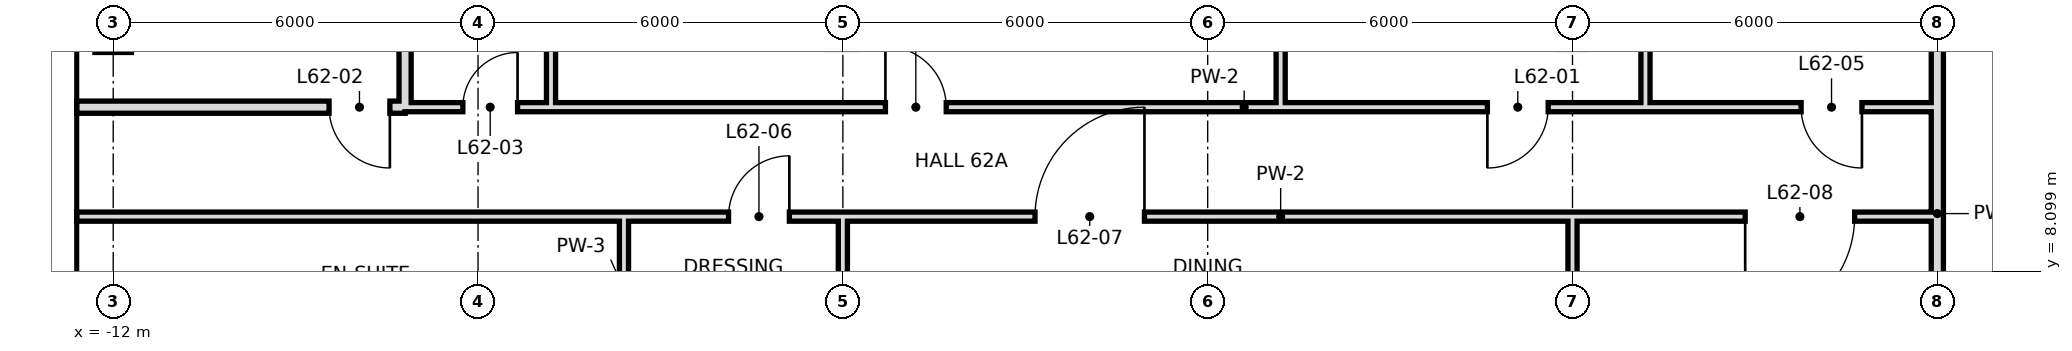
"""IFC4 building model, lengths in metres.
Left out: names, types, materials, properties, quantities, classifications, styles, units other than length and angle.
Written with IfcOpenShell. Run it as: python <this file> out.ifc"""

import sys

from ifc_helpers import new_model, si_unit, direction, frame, frame_2d, origin, place, context, subcontext, project, spatial, rectangle, extrude, element, fill, save


model = new_model("IFC4")
c1 = context("Model", 3, precision=1e-05, world=origin(), true_north=direction((0.0, 1.0)))
c2 = subcontext(c1, "Body", "Model", "MODEL_VIEW")
j1 = project(units=[si_unit("LENGTHUNIT", "METRE"), si_unit("PLANEANGLEUNIT", "RADIAN")], contexts=[c1])
p1 = place(None, origin())
s1 = spatial("IfcSite", under=j1, at=p1, CompositionType="ELEMENT")
p2 = place(p1, origin())
s2 = spatial("IfcBuilding", under=s1, at=p2, CompositionType="ELEMENT")
p3 = place(p2, frame((0.0, 0.0, 263.0)))
s3 = spatial("IfcBuildingStorey", under=s2, at=p3, CompositionType="ELEMENT", Elevation=263.0)
p4 = place(p3, frame((-3.6, 6.0, 0.0), z_axis=(0.0, 0.0, 1.0), x_axis=(0.0, 1.0, 0.0)))
e1 = element("IfcWall", 1, at=p4, inside=s3, PredefinedType="PARTITIONING", context=c2, shape_type="SweptSolid", body=[
    extrude(rectangle(XDim=3.0, YDim=0.15, at=frame_2d((1.5, 0.0))), origin(), (0.0, 0.0, 1.0), 3.42),
])
p5 = place(p3, frame((-4.8, 10.8, 0.0), z_axis=(0.0, 0.0, 1.0), x_axis=(0.0, 1.0, 0.0)))
e2 = element("IfcWall", 2, at=p5, inside=s3, PredefinedType="PARTITIONING", context=c2, shape_type="SweptSolid", body=[
    extrude(rectangle(XDim=7.2, YDim=0.15, at=frame_2d((3.6, 0.0))), origin(), (0.0, 0.0, 1.0), 3.42),
])
p6 = place(p3, frame((-7.2, 10.8, 0.0), z_axis=(0.0, 0.0, 1.0), x_axis=(0.0, 1.0, 0.0)))
e3 = element("IfcWall", 3, at=p6, inside=s3, PredefinedType="SOLIDWALL", context=c2, shape_type="SweptSolid", body=[
    extrude(rectangle(XDim=7.2, YDim=0.2, at=frame_2d((3.6, 0.0))), origin(), (0.0, 0.0, 1.0), 2.72),
])
for number, where, z_axis, x_axis in (
    (4, (0.0, 0.0, 0.0), (0.0, 0.0, 1.0), (0.0, 1.0, 0.0)),
    (5, (12.0, 0.0, 0.0), (0.0, 0.0, 1.0), (0.0, 1.0, 0.0)),
):
    element("IfcWall", number, at=place(p3, frame(where, z_axis=z_axis, x_axis=x_axis)), inside=s3, PredefinedType="PARTITIONING", context=c2, shape_type="SweptSolid", body=[
        extrude(rectangle(XDim=9.0, YDim=0.15, at=frame_2d((4.5, 0.0))), origin(), (0.0, 0.0, 1.0), 2.72),
    ])
p7 = place(p3, frame((13.2, 10.8, 0.0), z_axis=(0.0, 0.0, 1.0), x_axis=(0.0, 1.0, 0.0)))
e6 = element("IfcWall", 6, at=p7, inside=s3, PredefinedType="PARTITIONING", context=c2, shape_type="SweptSolid", body=[
    extrude(rectangle(XDim=7.9, YDim=0.15, at=frame_2d((3.95, 0.0))), origin(), (0.0, 0.0, 1.0), 3.42),
])
p8 = place(p3, frame((18.0, -0.6, 0.0), z_axis=(0.0, 0.0, 1.0), x_axis=(0.0, 1.0, 0.0)))
e7 = element("IfcWall", 7, at=p8, inside=s3, PredefinedType="SOLIDWALL", context=c2, shape_type="SweptSolid", body=[
    extrude(rectangle(XDim=19.3, YDim=0.2, at=frame_2d((9.65, 0.0))), origin(), (0.0, 0.0, 1.0), 2.72),
])
p9 = place(p3, frame((7.2, 10.8, 0.0), z_axis=(0.0, 0.0, 1.0), x_axis=(0.0, 1.0, 0.0)))
e8 = element("IfcWall", 8, at=p9, inside=s3, PredefinedType="PARTITIONING", context=c2, shape_type="SweptSolid", body=[
    extrude(rectangle(XDim=7.9, YDim=0.15, at=frame_2d((3.95, 0.0))), origin(), (0.0, 0.0, 1.0), 3.42),
])
p10 = place(p3, frame((-12.6, 10.8, 0.0), z_axis=(0.0, 0.0, 1.0), x_axis=(1.0, 0.0, 0.0)))
e9 = element("IfcWall", 9, at=p10, inside=s3, PredefinedType="SOLIDWALL", context=c2, shape_type="SweptSolid", body=[
    extrude(rectangle(XDim=5.4, YDim=0.2, at=frame_2d((2.7, 0.0))), origin(), (0.0, 0.0, 1.0), 2.97),
])
p11 = place(p10, frame((4.15, 0.0, 0.0)))
e10 = element("IfcOpeningElement", 10, at=p11, cuts=e9, PredefinedType="OPENING", context=c2, shape_type="SweptSolid", body=[
    extrude(rectangle(XDim=1.0, YDim=2.4, at=frame_2d((0.5, 1.2))), frame((0.0, 0.11, 0.0), z_axis=(0.0, -1.0, 0.0), x_axis=(1.0, 0.0, 0.0)), (0.0, 0.0, 1.0), 0.22),
])
p12 = place(p3, frame((-4.8, 10.8, 0.0), z_axis=(0.0, 0.0, 1.0), x_axis=(1.0, 0.0, 0.0)))
e11 = element("IfcWall", 11, at=p12, inside=s3, PredefinedType="PARTITIONING", context=c2, shape_type="SweptSolid", body=[
    extrude(rectangle(XDim=22.8, YDim=0.15, at=frame_2d((11.4, 0.0))), origin(), (0.0, 0.0, 1.0), 3.42),
])
p13 = place(p12, frame((15.4, 0.0, 0.0)))
e12 = element("IfcOpeningElement", 12, at=p13, cuts=e11, PredefinedType="OPENING", context=c2, shape_type="SweptSolid", body=[
    extrude(rectangle(XDim=1.0, YDim=2.4, at=frame_2d((0.5, 1.2))), frame((0.0, 0.085, 0.0), z_axis=(0.0, -1.0, 0.0), x_axis=(1.0, 0.0, 0.0)), (0.0, 0.0, 1.0), 0.17),
])
p14 = place(p12, frame((5.5, 0.0, 0.0)))
e13 = element("IfcOpeningElement", 13, at=p14, cuts=e11, PredefinedType="OPENING", context=c2, shape_type="SweptSolid", body=[
    extrude(rectangle(XDim=1.0, YDim=2.4, at=frame_2d((0.5, 1.2))), frame((0.0, 0.085, 0.0), z_axis=(0.0, -1.0, 0.0), x_axis=(1.0, 0.0, 0.0)), (0.0, 0.0, 1.0), 0.17),
])
p15 = place(p12, frame((20.56, 0.0, 0.0)))
e14 = element("IfcOpeningElement", 14, at=p15, cuts=e11, PredefinedType="OPENING", context=c2, shape_type="SweptSolid", body=[
    extrude(rectangle(XDim=1.0, YDim=2.4, at=frame_2d((0.5, 1.2))), frame((0.0, 0.085, 0.0), z_axis=(0.0, -1.0, 0.0), x_axis=(1.0, 0.0, 0.0)), (0.0, 0.0, 1.0), 0.17),
])
p16 = place(p3, frame((-7.2, 10.8, 0.0), z_axis=(0.0, 0.0, 1.0), x_axis=(1.0, 0.0, 0.0)))
e15 = element("IfcWall", 15, at=p16, inside=s3, PredefinedType="PARTITIONING", context=c2, shape_type="SweptSolid", body=[
    extrude(rectangle(XDim=2.4, YDim=0.15, at=frame_2d((1.2, 0.0))), origin(), (0.0, 0.0, 1.0), 3.42),
])
p17 = place(p16, frame((0.95, 0.0, 0.0)))
e16 = element("IfcOpeningElement", 16, at=p17, cuts=e15, PredefinedType="OPENING", context=c2, shape_type="SweptSolid", body=[
    extrude(rectangle(XDim=0.9, YDim=2.4, at=frame_2d((0.45, 1.2))), frame((0.0, 0.085, 0.0), z_axis=(0.0, -1.0, 0.0), x_axis=(1.0, 0.0, 0.0)), (0.0, 0.0, 1.0), 0.17),
])
p18 = place(p3, frame((-3.6, 9.0, 0.0), z_axis=(0.0, 0.0, 1.0), x_axis=(1.0, 0.0, 0.0)))
e17 = element("IfcWall", 17, at=p18, inside=s3, PredefinedType="PARTITIONING", context=c2, shape_type="SweptSolid", body=[
    extrude(rectangle(XDim=21.6, YDim=0.15, at=frame_2d((10.8, 0.0))), origin(), (0.0, 0.0, 1.0), 3.42),
])
p19 = place(p18, frame((1.72, 0.0, 0.0)))
e18 = element("IfcOpeningElement", 18, at=p19, cuts=e17, PredefinedType="OPENING", context=c2, shape_type="SweptSolid", body=[
    extrude(rectangle(XDim=1.0, YDim=2.4, at=frame_2d((0.5, 1.2))), frame((0.0, 0.085, 0.0), z_axis=(0.0, -1.0, 0.0), x_axis=(1.0, 0.0, 0.0)), (0.0, 0.0, 1.0), 0.17),
])
p20 = place(p18, frame((6.76, 0.0, 0.0)))
e19 = element("IfcOpeningElement", 19, at=p20, cuts=e17, PredefinedType="OPENING", context=c2, shape_type="SweptSolid", body=[
    extrude(rectangle(XDim=1.8, YDim=2.4, at=frame_2d((0.9, 1.2))), frame((0.0, 0.085, 0.0), z_axis=(0.0, -1.0, 0.0), x_axis=(1.0, 0.0, 0.0)), (0.0, 0.0, 1.0), 0.17),
])
p21 = place(p18, frame((18.44, 0.0, 0.0)))
e20 = element("IfcOpeningElement", 20, at=p21, cuts=e17, PredefinedType="OPENING", context=c2, shape_type="SweptSolid", body=[
    extrude(rectangle(XDim=1.8, YDim=2.4, at=frame_2d((0.9, 1.2))), frame((0.0, 0.085, 0.0), z_axis=(0.0, -1.0, 0.0), x_axis=(1.0, 0.0, 0.0)), (0.0, 0.0, 1.0), 0.17),
])
p22 = place(p3, frame((-12.6, 9.0, 0.0), z_axis=(0.0, 0.0, 1.0), x_axis=(1.0, 0.0, 0.0)))
e21 = element("IfcWall", 21, at=p22, inside=s3, PredefinedType="PARTITIONING", context=c2, shape_type="SweptSolid", body=[
    extrude(rectangle(XDim=9.0, YDim=0.15, at=frame_2d((4.5, 0.0))), origin(), (0.0, 0.0, 1.0), 3.42),
])
p23 = place(p13, frame((1.0, 0.0, 0.0), z_axis=(0.0, 0.0, 1.0), x_axis=(-1.0, 0.0, 0.0)))
e22 = element("IfcDoor", 22, at=p23, inside=s3, OperationType="SINGLE_SWING_RIGHT", PredefinedType="DOOR", context=c2, shape_type="SweptSolid", body=[
    extrude(rectangle(XDim=1.0, YDim=2.4, at=frame_2d((0.5, 1.2))), frame((0.0, 0.025, 0.0), z_axis=(0.0, -1.0, 0.0), x_axis=(1.0, 0.0, 0.0)), (0.0, 0.0, 1.0), 0.05),
])
fill(e12, e22)
p24 = place(p11, origin())
e23 = element("IfcDoor", 23, at=p24, inside=s3, OperationType="SINGLE_SWING_RIGHT", PredefinedType="DOOR", context=c2, shape_type="SweptSolid", body=[
    extrude(rectangle(XDim=1.0, YDim=2.4, at=frame_2d((0.5, 1.2))), frame((0.0, 0.025, 0.0), z_axis=(0.0, -1.0, 0.0), x_axis=(1.0, 0.0, 0.0)), (0.0, 0.0, 1.0), 0.05),
])
fill(e10, e23)
p25 = place(p17, frame((0.9, 0.0, 0.0), z_axis=(0.0, 0.0, 1.0), x_axis=(-1.0, 0.0, 0.0)))
e24 = element("IfcDoor", 24, at=p25, inside=s3, OperationType="SINGLE_SWING_LEFT", PredefinedType="DOOR", context=c2, shape_type="SweptSolid", body=[
    extrude(rectangle(XDim=0.9, YDim=2.4, at=frame_2d((0.45, 1.2))), frame((0.0, 0.025, 0.0), z_axis=(0.0, -1.0, 0.0), x_axis=(1.0, 0.0, 0.0)), (0.0, 0.0, 1.0), 0.05),
])
fill(e16, e24)
p26 = place(p14, origin())
e25 = element("IfcDoor", 25, at=p26, inside=s3, OperationType="SINGLE_SWING_LEFT", PredefinedType="DOOR", context=c2, shape_type="SweptSolid", body=[
    extrude(rectangle(XDim=1.0, YDim=2.4, at=frame_2d((0.5, 1.2))), frame((0.0, 0.025, 0.0), z_axis=(0.0, -1.0, 0.0), x_axis=(1.0, 0.0, 0.0)), (0.0, 0.0, 1.0), 0.05),
])
fill(e13, e25)
p27 = place(p15, origin())
e26 = element("IfcDoor", 26, at=p27, inside=s3, OperationType="SINGLE_SWING_RIGHT", PredefinedType="DOOR", context=c2, shape_type="SweptSolid", body=[
    extrude(rectangle(XDim=1.0, YDim=2.4, at=frame_2d((0.5, 1.2))), frame((0.0, 0.025, 0.0), z_axis=(0.0, -1.0, 0.0), x_axis=(1.0, 0.0, 0.0)), (0.0, 0.0, 1.0), 0.05),
])
fill(e14, e26)
p28 = place(p19, frame((1.0, 0.0, 0.0), z_axis=(0.0, 0.0, 1.0), x_axis=(-1.0, 0.0, 0.0)))
e27 = element("IfcDoor", 27, at=p28, inside=s3, OperationType="SINGLE_SWING_LEFT", PredefinedType="DOOR", context=c2, shape_type="SweptSolid", body=[
    extrude(rectangle(XDim=1.0, YDim=2.4, at=frame_2d((0.5, 1.2))), frame((0.0, 0.025, 0.0), z_axis=(0.0, -1.0, 0.0), x_axis=(1.0, 0.0, 0.0)), (0.0, 0.0, 1.0), 0.05),
])
fill(e18, e27)
p29 = place(p20, frame((1.8, 0.0, 0.0), z_axis=(0.0, 0.0, 1.0), x_axis=(-1.0, 0.0, 0.0)))
e28 = element("IfcDoor", 28, at=p29, inside=s3, OperationType="SINGLE_SWING_LEFT", PredefinedType="DOOR", context=c2, shape_type="SweptSolid", body=[
    extrude(rectangle(XDim=1.8, YDim=2.4, at=frame_2d((0.9, 1.2))), frame((0.0, 0.025, 0.0), z_axis=(0.0, -1.0, 0.0), x_axis=(1.0, 0.0, 0.0)), (0.0, 0.0, 1.0), 0.05),
])
fill(e19, e28)
p30 = place(p21, frame((1.8, 0.0, 0.0), z_axis=(0.0, 0.0, 1.0), x_axis=(-1.0, 0.0, 0.0)))
e29 = element("IfcDoor", 29, at=p30, inside=s3, OperationType="SINGLE_SWING_RIGHT", PredefinedType="DOOR", context=c2, shape_type="SweptSolid", body=[
    extrude(rectangle(XDim=1.8, YDim=2.4, at=frame_2d((0.9, 1.2))), frame((0.0, 0.025, 0.0), z_axis=(0.0, -1.0, 0.0), x_axis=(1.0, 0.0, 0.0)), (0.0, 0.0, 1.0), 0.05),
])
fill(e20, e29)
save(model, sys.argv[1])
